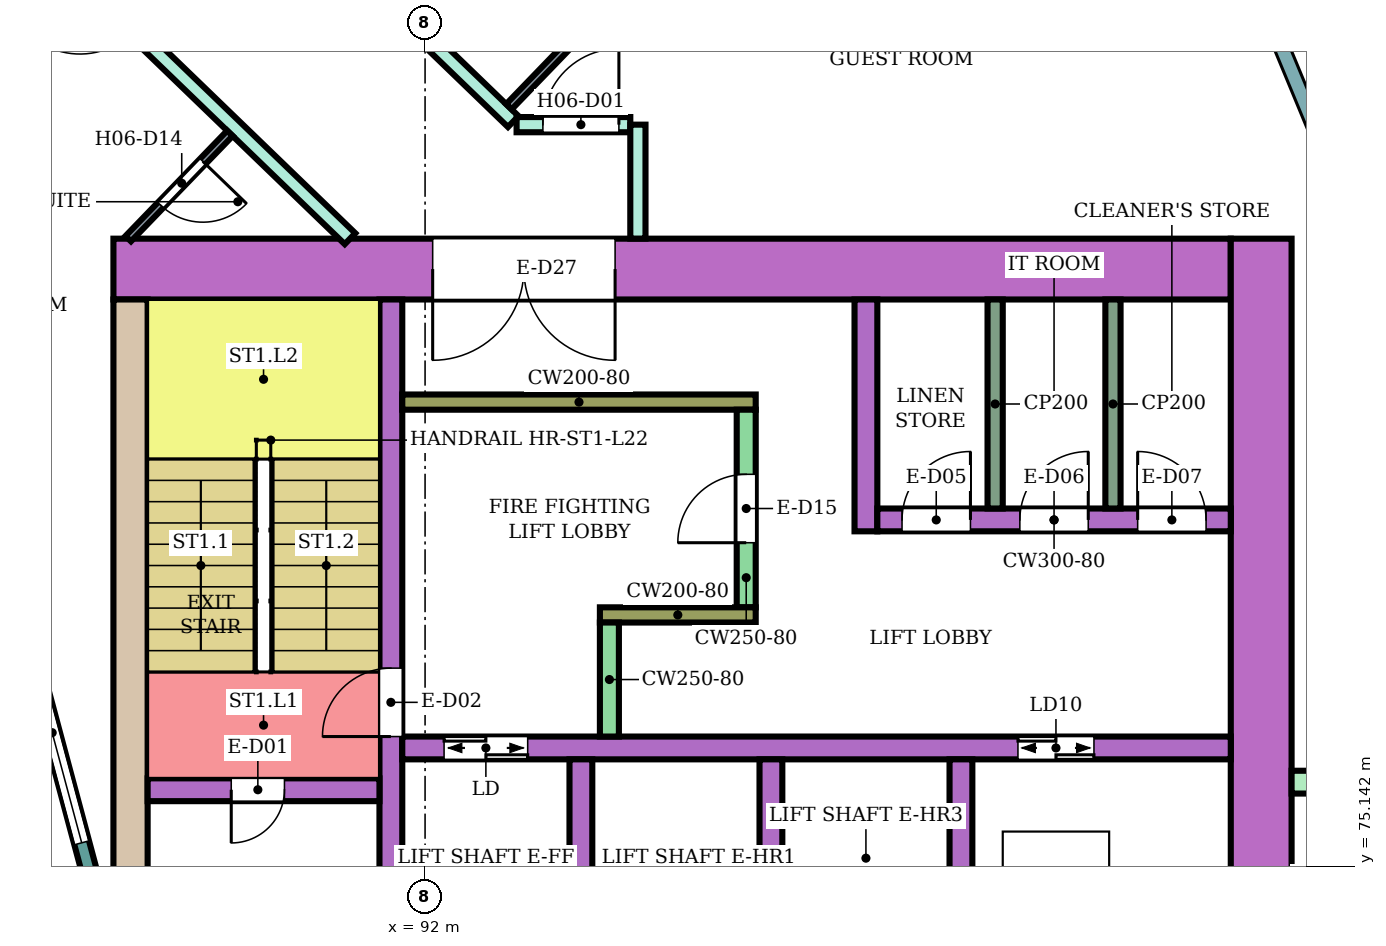
"""IFC4 building model, lengths in metres.
Left out: names, types, materials, properties, quantities, classifications, styles, units other than length and angle.
Written with IfcOpenShell. Run it as: python <this file> out.ifc"""

import sys

from ifc_helpers import new_model, si_unit, direction, frame, frame_2d, origin, place, context, subcontext, project, spatial, rectangle, extrude, element, fill, save


model = new_model("IFC4")
c1 = context("Model", 3, precision=1e-05, world=origin(), true_north=direction((0.0, 1.0)))
c2 = subcontext(c1, "Body", "Model", "MODEL_VIEW")
j1 = project(units=[si_unit("LENGTHUNIT", "METRE"), si_unit("PLANEANGLEUNIT", "RADIAN")], contexts=[c1])
p1 = place(None, origin())
s1 = spatial("IfcSite", under=j1, at=p1, CompositionType="ELEMENT")
p2 = place(p1, origin())
s2 = spatial("IfcBuilding", under=s1, at=p2, CompositionType="ELEMENT")
p3 = place(p2, frame((0.0, 0.0, 97.6)))
s3 = spatial("IfcBuildingStorey", under=s2, at=p3, CompositionType="ELEMENT", Elevation=97.6)
p4 = place(p3, frame((87.9, 83.0, 0.0), z_axis=(0.0, 0.0, 1.0), x_axis=(1.0, 0.0, 0.0)))
e1 = element("IfcWall", 1, at=p4, inside=s3, PredefinedType="SHEAR", context=c2, shape_type="SweptSolid", body=[
    extrude(rectangle(XDim=14.7, YDim=0.8, at=frame_2d((7.35, 0.0))), origin(), (0.0, 0.0, 1.0), 3.48),
])
p5 = place(p4, frame((4.2, 0.0, 0.0)))
e2 = element("IfcOpeningElement", 2, at=p5, cuts=e1, PredefinedType="OPENING", context=c2, shape_type="SweptSolid", body=[
    extrude(rectangle(XDim=2.4, YDim=2.4, at=frame_2d((1.2, 1.2))), frame((0.0, 0.41, 0.0), z_axis=(0.0, -1.0, 0.0), x_axis=(1.0, 0.0, 0.0)), (0.0, 0.0, 1.0), 0.82),
])
p6 = place(p3, frame((88.125, 75.0, 0.0), z_axis=(0.0, 0.0, 1.0), x_axis=(0.0, 1.0, 0.0)))
e3 = element("IfcWall", 3, at=p6, inside=s3, PredefinedType="SHEAR", context=c2, shape_type="SweptSolid", body=[
    extrude(rectangle(XDim=7.6, YDim=0.45, at=frame_2d((3.8, 0.0))), origin(), (0.0, 0.0, 1.0), 3.48),
])
p7 = place(p3, frame((103.0, 66.6, 0.0), z_axis=(0.0, 0.0, 1.0), x_axis=(0.0, 1.0, 0.0)))
e4 = element("IfcWall", 4, at=p7, inside=s3, PredefinedType="SHEAR", context=c2, shape_type="SweptSolid", body=[
    extrude(rectangle(XDim=16.8, YDim=0.8, at=frame_2d((8.4, 0.0))), origin(), (0.0, 0.0, 1.0), 3.48),
])
p8 = place(p3, frame((91.55, 75.0, 0.0), z_axis=(0.0, 0.0, 1.0), x_axis=(0.0, 1.0, 0.0)))
e5 = element("IfcWall", 5, at=p8, inside=s3, PredefinedType="SHEAR", context=c2, shape_type="SweptSolid", body=[
    extrude(rectangle(XDim=7.6, YDim=0.3, at=frame_2d((3.8, 0.0))), origin(), (0.0, 0.0, 1.0), 3.48),
])
p9 = place(p8, frame((1.85, 0.0, 0.0)))
e6 = element("IfcOpeningElement", 6, at=p9, cuts=e5, PredefinedType="OPENING", context=c2, shape_type="SweptSolid", body=[
    extrude(rectangle(XDim=0.9, YDim=2.1, at=frame_2d((0.45, 1.05))), frame((0.0, 0.16, 0.0), z_axis=(0.0, -1.0, 0.0), x_axis=(1.0, 0.0, 0.0)), (0.0, 0.0, 1.0), 0.32),
])
p10 = place(p3, frame((88.35, 76.15, 0.0), z_axis=(0.0, 0.0, 1.0), x_axis=(1.0, 0.0, 0.0)))
e7 = element("IfcWall", 7, at=p10, inside=s3, PredefinedType="SHEAR", context=c2, shape_type="SweptSolid", body=[
    extrude(rectangle(XDim=3.05, YDim=0.3, at=frame_2d((1.525, 0.0))), origin(), (0.0, 0.0, 1.0), 3.48),
])
p11 = place(p10, frame((1.1, 0.0, 0.0)))
e8 = element("IfcOpeningElement", 8, at=p11, cuts=e7, PredefinedType="OPENING", context=c2, shape_type="SweptSolid", body=[
    extrude(rectangle(XDim=0.7, YDim=2.0, at=frame_2d((0.35, 1.0))), frame((0.0, 0.16, 0.0), z_axis=(0.0, -1.0, 0.0), x_axis=(1.0, 0.0, 0.0)), (0.0, 0.0, 1.0), 0.32),
])
p12 = place(p3, frame((91.7, 76.7, 0.0), z_axis=(0.0, 0.0, 1.0), x_axis=(1.0, 0.0, 0.0)))
e9 = element("IfcWall", 9, at=p12, inside=s3, PredefinedType="SHEAR", context=c2, shape_type="SweptSolid", body=[
    extrude(rectangle(XDim=10.9, YDim=0.3, at=frame_2d((5.45, 0.0))), origin(), (0.0, 0.0, 1.0), 3.48),
])
p13 = place(p12, frame((0.55, 0.0, 0.0)))
e10 = element("IfcOpeningElement", 10, at=p13, cuts=e9, PredefinedType="OPENING", context=c2, shape_type="SweptSolid", body=[
    extrude(rectangle(XDim=1.1, YDim=2.1, at=frame_2d((0.55, 1.05))), frame((0.0, 0.16, 0.0), z_axis=(0.0, -1.0, 0.0), x_axis=(1.0, 0.0, 0.0)), (0.0, 0.0, 1.0), 0.32),
])
p14 = place(p12, frame((8.1, 0.0, 0.0)))
e11 = element("IfcOpeningElement", 11, at=p14, cuts=e9, PredefinedType="OPENING", context=c2, shape_type="SweptSolid", body=[
    extrude(rectangle(XDim=1.0, YDim=2.1, at=frame_2d((0.5, 1.05))), frame((0.0, 0.16, 0.0), z_axis=(0.0, -1.0, 0.0), x_axis=(1.0, 0.0, 0.0)), (0.0, 0.0, 1.0), 0.32),
])
for number, where, z_axis, x_axis in (
    (12, (94.05, 74.0, 0.0), (0.0, 0.0, 1.0), (0.0, 1.0, 0.0)),
    (13, (96.55, 74.0, 0.0), (0.0, 0.0, 1.0), (0.0, 1.0, 0.0)),
    (14, (99.05, 74.0, 0.0), (0.0, 0.0, 1.0), (0.0, 1.0, 0.0)),
):
    element("IfcWall", number, at=place(p3, frame(where, z_axis=z_axis, x_axis=x_axis)), inside=s3, PredefinedType="SHEAR", context=c2, shape_type="SweptSolid", body=[
        extrude(rectangle(XDim=2.55, YDim=0.3, at=frame_2d((1.275, 0.0))), origin(), (0.0, 0.0, 1.0), 3.48),
    ])
p15 = place(p3, frame((91.7, 81.25, 0.0), z_axis=(0.0, 0.0, 1.0), x_axis=(1.0, 0.0, 0.0)))
e15 = element("IfcWall", 15, at=p15, inside=s3, PredefinedType="SHEAR", context=c2, shape_type="SweptSolid", body=[
    extrude(rectangle(XDim=4.65, YDim=0.2, at=frame_2d((2.325, 0.0))), origin(), (0.0, 0.0, 1.0), 3.48),
])
p16 = place(p3, frame((96.225, 78.55, 0.0), z_axis=(0.0, 0.0, 1.0), x_axis=(0.0, 1.0, 0.0)))
e16 = element("IfcWall", 16, at=p16, inside=s3, PredefinedType="SHEAR", context=c2, shape_type="SweptSolid", body=[
    extrude(rectangle(XDim=2.6, YDim=0.25, at=frame_2d((1.3, 0.0))), origin(), (0.0, 0.0, 1.0), 3.48),
])
p17 = place(p16, frame((0.85, 0.0, 0.0)))
e17 = element("IfcOpeningElement", 17, at=p17, cuts=e16, PredefinedType="OPENING", context=c2, shape_type="SweptSolid", body=[
    extrude(rectangle(XDim=0.9, YDim=2.1, at=frame_2d((0.45, 1.05))), frame((0.0, 0.135, 0.0), z_axis=(0.0, -1.0, 0.0), x_axis=(1.0, 0.0, 0.0)), (0.0, 0.0, 1.0), 0.27),
])
p18 = place(p3, frame((94.3, 78.45, 0.0), z_axis=(0.0, 0.0, 1.0), x_axis=(1.0, 0.0, 0.0)))
e18 = element("IfcWall", 18, at=p18, inside=s3, PredefinedType="SHEAR", context=c2, shape_type="SweptSolid", body=[
    extrude(rectangle(XDim=2.05, YDim=0.2, at=frame_2d((1.025, 0.0))), origin(), (0.0, 0.0, 1.0), 3.48),
])
p19 = place(p3, frame((94.425, 76.85, 0.0), z_axis=(0.0, 0.0, 1.0), x_axis=(0.0, 1.0, 0.0)))
e19 = element("IfcWall", 19, at=p19, inside=s3, PredefinedType="SHEAR", context=c2, shape_type="SweptSolid", body=[
    extrude(rectangle(XDim=1.5, YDim=0.25, at=frame_2d((0.75, 0.0))), origin(), (0.0, 0.0, 1.0), 3.48),
])
p20 = place(p3, frame((97.8, 79.55, 0.0), z_axis=(0.0, 0.0, 1.0), x_axis=(0.0, 1.0, 0.0)))
e20 = element("IfcWall", 20, at=p20, inside=s3, PredefinedType="SHEAR", context=c2, shape_type="SweptSolid", body=[
    extrude(rectangle(XDim=3.05, YDim=0.3, at=frame_2d((1.525, 0.0))), origin(), (0.0, 0.0, 1.0), 3.48),
])
p21 = place(p3, frame((97.95, 79.7, 0.0), z_axis=(0.0, 0.0, 1.0), x_axis=(1.0, 0.0, 0.0)))
e21 = element("IfcWall", 21, at=p21, inside=s3, PredefinedType="SHEAR", context=c2, shape_type="SweptSolid", body=[
    extrude(rectangle(XDim=4.65, YDim=0.3, at=frame_2d((2.325, 0.0))), origin(), (0.0, 0.0, 1.0), 3.48),
])
p22 = place(p21, frame((0.325, 0.0, 0.0)))
e22 = element("IfcOpeningElement", 22, at=p22, cuts=e21, PredefinedType="OPENING", context=c2, shape_type="SweptSolid", body=[
    extrude(rectangle(XDim=0.9, YDim=2.1, at=frame_2d((0.45, 1.05))), frame((0.0, 0.16, 0.0), z_axis=(0.0, -1.0, 0.0), x_axis=(1.0, 0.0, 0.0)), (0.0, 0.0, 1.0), 0.32),
])
p23 = place(p21, frame((1.875, 0.0, 0.0)))
e23 = element("IfcOpeningElement", 23, at=p23, cuts=e21, PredefinedType="OPENING", context=c2, shape_type="SweptSolid", body=[
    extrude(rectangle(XDim=0.9, YDim=2.1, at=frame_2d((0.45, 1.05))), frame((0.0, 0.16, 0.0), z_axis=(0.0, -1.0, 0.0), x_axis=(1.0, 0.0, 0.0)), (0.0, 0.0, 1.0), 0.32),
])
p24 = place(p21, frame((3.425, 0.0, 0.0)))
e24 = element("IfcOpeningElement", 24, at=p24, cuts=e21, PredefinedType="OPENING", context=c2, shape_type="SweptSolid", body=[
    extrude(rectangle(XDim=0.9, YDim=2.1, at=frame_2d((0.45, 1.05))), frame((0.0, 0.16, 0.0), z_axis=(0.0, -1.0, 0.0), x_axis=(1.0, 0.0, 0.0)), (0.0, 0.0, 1.0), 0.32),
])
p25 = place(p3, frame((103.4, 76.25, 0.0), z_axis=(0.0, 0.0, 1.0), x_axis=(1.0, 0.0, 0.0)))
e25 = element("IfcWall", 25, at=p25, inside=s3, PredefinedType="NOTDEFINED", context=c2, shape_type="SweptSolid", body=[
    extrude(rectangle(XDim=2.416, YDim=0.3, at=frame_2d((1.208, 0.0))), origin(), (0.0, 0.0, 1.0), 3.8),
])
p26 = place(p3, frame((87.604, 75.0, 0.0), z_axis=(0.0, 0.0, 1.0), x_axis=(-0.258789828301, 0.965933654434, 0.0)))
e26 = element("IfcWall", 26, at=p26, inside=s3, PredefinedType="NOTDEFINED", context=c2, shape_type="SweptSolid", body=[
    extrude(rectangle(XDim=3.936, YDim=0.2, at=frame_2d((1.968, 0.0))), origin(), (0.0, 0.0, 1.0), 3.8),
])
p27 = place(p26, frame((0.468, 0.0, 0.9)))
e27 = element("IfcOpeningElement", 27, at=p27, cuts=e26, PredefinedType="OPENING", context=c2, shape_type="SweptSolid", body=[
    extrude(rectangle(XDim=3.0, YDim=2.3, at=frame_2d((1.5, 1.15))), frame((0.0, 0.11, 0.0), z_axis=(0.0, -1.0, 0.0), x_axis=(1.0, 0.0, 0.0)), (0.0, 0.0, 1.0), 0.22),
])
p28 = place(p3, frame((87.064, 87.211, 0.0), z_axis=(0.0, 0.0, 1.0), x_axis=(0.719540958932, -0.694450004262, 0.0)))
e28 = element("IfcWall", 28, at=p28, inside=s3, PredefinedType="PARTITIONING", context=c2, shape_type="SweptSolid", body=[
    extrude(rectangle(XDim=5.488, YDim=0.2, at=frame_2d((2.744, 0.0))), origin(), (0.0, 0.0, 1.0), 3.35),
])
p29 = place(p28, frame((0.55, 0.0, 0.0)))
e29 = element("IfcOpeningElement", 29, at=p29, cuts=e28, PredefinedType="OPENING", context=c2, shape_type="SweptSolid", body=[
    extrude(rectangle(XDim=1.0, YDim=2.1, at=frame_2d((0.5, 1.05))), frame((0.0, 0.11, 0.0), z_axis=(0.0, -1.0, 0.0), x_axis=(1.0, 0.0, 0.0)), (0.0, 0.0, 1.0), 0.22),
])
p30 = place(p3, frame((88.465, 89.473, 0.0), z_axis=(0.0, 0.0, 1.0), x_axis=(0.719474304909, -0.694519059908, 0.0)))
e30 = element("IfcWall", 30, at=p30, inside=s3, PredefinedType="PARTITIONING", context=c2, shape_type="SweptSolid", body=[
    extrude(rectangle(XDim=6.525, YDim=0.2, at=frame_2d((3.263, 0.0))), origin(), (0.0, 0.0, 1.0), 3.35),
])
p31 = place(p30, frame((2.633, 0.0, 0.0)))
e31 = element("IfcOpeningElement", 31, at=p31, cuts=e30, PredefinedType="OPENING", context=c2, shape_type="SweptSolid", body=[
    extrude(rectangle(XDim=1.1, YDim=2.1, at=frame_2d((0.55, 1.05))), frame((0.0, 0.11, 0.0), z_axis=(0.0, -1.0, 0.0), x_axis=(1.0, 0.0, 0.0)), (0.0, 0.0, 1.0), 0.22),
])
p32 = place(p3, frame((93.204, 84.9, 0.0), z_axis=(0.0, 0.0, 1.0), x_axis=(1.0, 0.0, 0.0)))
e32 = element("IfcWall", 32, at=p32, inside=s3, PredefinedType="PARTITIONING", context=c2, shape_type="SweptSolid", body=[
    extrude(rectangle(XDim=1.496, YDim=0.2, at=frame_2d((0.748, 0.0))), origin(), (0.0, 0.0, 1.0), 3.35),
])
p33 = place(p32, frame((0.346, 0.0, 0.0)))
e33 = element("IfcOpeningElement", 33, at=p33, cuts=e32, PredefinedType="OPENING", context=c2, shape_type="SweptSolid", body=[
    extrude(rectangle(XDim=1.0, YDim=2.1, at=frame_2d((0.5, 1.05))), frame((0.0, 0.11, 0.0), z_axis=(0.0, -1.0, 0.0), x_axis=(1.0, 0.0, 0.0)), (0.0, 0.0, 1.0), 0.22),
])
p34 = place(p3, frame((94.8, 83.401, 0.0), z_axis=(0.0, 0.0, 1.0), x_axis=(0.0, 1.0, 0.0)))
e34 = element("IfcWall", 34, at=p34, inside=s3, PredefinedType="PARTITIONING", context=c2, shape_type="SweptSolid", body=[
    extrude(rectangle(XDim=1.499, YDim=0.2, at=frame_2d((0.75, 0.0))), origin(), (0.0, 0.0, 1.0), 3.35),
])
p35 = place(p3, frame((88.095, 83.4, 0.0), z_axis=(0.0, 0.0, 1.0), x_axis=(0.694447472534, 0.719543402368, 0.0)))
e35 = element("IfcWall", 35, at=p35, inside=s3, PredefinedType="PARTITIONING", context=c2, shape_type="SweptSolid", body=[
    extrude(rectangle(XDim=1.926, YDim=0.1, at=frame_2d((0.963, 0.0))), origin(), (0.0, 0.0, 1.0), 3.35),
])
p36 = place(p35, frame((0.613, 0.0, 0.0)))
e36 = element("IfcOpeningElement", 36, at=p36, cuts=e35, PredefinedType="OPENING", context=c2, shape_type="SweptSolid", body=[
    extrude(rectangle(XDim=0.8, YDim=2.1, at=frame_2d((0.4, 1.05))), frame((0.0, 0.06, 0.0), z_axis=(0.0, -1.0, 0.0), x_axis=(1.0, 0.0, 0.0)), (0.0, 0.0, 1.0), 0.12),
])
p37 = place(p3, frame((93.104, 85.136, 0.0), z_axis=(0.0, 0.0, 1.0), x_axis=(0.694324808789, 0.719661767708, 0.0)))
e37 = element("IfcWall", 37, at=p37, inside=s3, PredefinedType="PARTITIONING", context=c2, shape_type="SweptSolid", body=[
    extrude(rectangle(XDim=2.65, YDim=0.1, at=frame_2d((1.325, 0.0))), origin(), (0.0, 0.0, 1.0), 3.35),
])
p38 = place(p37, frame((1.05, 0.0, 0.0)))
e38 = element("IfcOpeningElement", 38, at=p38, cuts=e37, PredefinedType="OPENING", context=c2, shape_type="SweptSolid", body=[
    extrude(rectangle(XDim=0.8, YDim=2.1, at=frame_2d((0.4, 1.05))), frame((0.0, 0.06, 0.0), z_axis=(0.0, -1.0, 0.0), x_axis=(1.0, 0.0, 0.0)), (0.0, 0.0, 1.0), 0.12),
])
for number, where, z_axis, x_axis in (
    (39, (99.5, 79.85, 0.0), (0.0, 0.0, 1.0), (0.0, 1.0, 0.0)),
    (40, (101.05, 79.85, 0.0), (0.0, 0.0, 1.0), (0.0, 1.0, 0.0)),
):
    element("IfcWall", number, at=place(p3, frame(where, z_axis=z_axis, x_axis=x_axis)), inside=s3, PredefinedType="PARTITIONING", context=c2, shape_type="SweptSolid", body=[
        extrude(rectangle(XDim=2.75, YDim=0.2, at=frame_2d((1.375, 0.0))), origin(), (0.0, 0.0, 1.0), 3.48),
    ])
p39 = place(p27, origin())
e41 = element("IfcWindow", 41, at=p39, inside=s3, PartitioningType="SINGLE_PANEL", PredefinedType="WINDOW", context=c2, shape_type="SweptSolid", body=[
    extrude(rectangle(XDim=3.0, YDim=2.3, at=frame_2d((1.5, 1.15))), frame((0.0, 0.03, 0.0), z_axis=(0.0, -1.0, 0.0), x_axis=(1.0, 0.0, 0.0)), (0.0, 0.0, 1.0), 0.06),
])
fill(e27, e41)
p40 = place(p33, origin())
e42 = element("IfcDoor", 42, at=p40, inside=s3, OperationType="SINGLE_SWING_RIGHT", PredefinedType="DOOR", context=c2, shape_type="SweptSolid", body=[
    extrude(rectangle(XDim=1.0, YDim=2.1, at=frame_2d((0.5, 1.05))), frame((0.0, 0.025, 0.0), z_axis=(0.0, -1.0, 0.0), x_axis=(1.0, 0.0, 0.0)), (0.0, 0.0, 1.0), 0.05),
])
fill(e33, e42)
p41 = place(p36, frame((0.8, 0.0, 0.0), z_axis=(0.0, 0.0, 1.0), x_axis=(-1.0, 0.0, 0.0)))
e43 = element("IfcDoor", 43, at=p41, inside=s3, OperationType="SINGLE_SWING_LEFT", PredefinedType="DOOR", context=c2, shape_type="SweptSolid", body=[
    extrude(rectangle(XDim=0.8, YDim=2.1, at=frame_2d((0.4, 1.05))), frame((0.0, 0.025, 0.0), z_axis=(0.0, -1.0, 0.0), x_axis=(1.0, 0.0, 0.0)), (0.0, 0.0, 1.0), 0.05),
])
fill(e36, e43)
p42 = place(p11, frame((0.7, 0.0, 0.0), z_axis=(0.0, 0.0, 1.0), x_axis=(-1.0, 0.0, 0.0)))
e44 = element("IfcDoor", 44, at=p42, inside=s3, OperationType="SINGLE_SWING_RIGHT", PredefinedType="DOOR", context=c2, shape_type="SweptSolid", body=[
    extrude(rectangle(XDim=0.7, YDim=2.0, at=frame_2d((0.35, 1.0))), frame((0.0, 0.025, 0.0), z_axis=(0.0, -1.0, 0.0), x_axis=(1.0, 0.0, 0.0)), (0.0, 0.0, 1.0), 0.05),
])
fill(e8, e44)
p43 = place(p9, origin())
e45 = element("IfcDoor", 45, at=p43, inside=s3, OperationType="SINGLE_SWING_LEFT", PredefinedType="DOOR", context=c2, shape_type="SweptSolid", body=[
    extrude(rectangle(XDim=0.9, YDim=2.1, at=frame_2d((0.45, 1.05))), frame((0.0, 0.025, 0.0), z_axis=(0.0, -1.0, 0.0), x_axis=(1.0, 0.0, 0.0)), (0.0, 0.0, 1.0), 0.05),
])
fill(e6, e45)
p44 = place(p13, origin())
e46 = element("IfcDoor", 46, at=p44, inside=s3, OperationType="DOUBLE_DOOR_SLIDING", PredefinedType="DOOR", context=c2, shape_type="SweptSolid", body=[
    extrude(rectangle(XDim=1.1, YDim=2.1, at=frame_2d((0.55, 1.05))), frame((0.0, 0.025, 0.0), z_axis=(0.0, -1.0, 0.0), x_axis=(1.0, 0.0, 0.0)), (0.0, 0.0, 1.0), 0.05),
])
fill(e10, e46)
p45 = place(p14, origin())
e47 = element("IfcDoor", 47, at=p45, inside=s3, OperationType="DOUBLE_DOOR_SLIDING", PredefinedType="DOOR", context=c2, shape_type="SweptSolid", body=[
    extrude(rectangle(XDim=1.0, YDim=2.1, at=frame_2d((0.5, 1.05))), frame((0.0, 0.025, 0.0), z_axis=(0.0, -1.0, 0.0), x_axis=(1.0, 0.0, 0.0)), (0.0, 0.0, 1.0), 0.05),
])
fill(e11, e47)
p46 = place(p17, origin())
e48 = element("IfcDoor", 48, at=p46, inside=s3, OperationType="SINGLE_SWING_LEFT", PredefinedType="DOOR", context=c2, shape_type="SweptSolid", body=[
    extrude(rectangle(XDim=0.9, YDim=2.1, at=frame_2d((0.45, 1.05))), frame((0.0, 0.025, 0.0), z_axis=(0.0, -1.0, 0.0), x_axis=(1.0, 0.0, 0.0)), (0.0, 0.0, 1.0), 0.05),
])
fill(e17, e48)
p47 = place(p22, origin())
e49 = element("IfcDoor", 49, at=p47, inside=s3, OperationType="SINGLE_SWING_RIGHT", PredefinedType="DOOR", context=c2, shape_type="SweptSolid", body=[
    extrude(rectangle(XDim=0.9, YDim=2.1, at=frame_2d((0.45, 1.05))), frame((0.0, 0.025, 0.0), z_axis=(0.0, -1.0, 0.0), x_axis=(1.0, 0.0, 0.0)), (0.0, 0.0, 1.0), 0.05),
])
fill(e22, e49)
p48 = place(p23, origin())
e50 = element("IfcDoor", 50, at=p48, inside=s3, OperationType="SINGLE_SWING_RIGHT", PredefinedType="DOOR", context=c2, shape_type="SweptSolid", body=[
    extrude(rectangle(XDim=0.9, YDim=2.1, at=frame_2d((0.45, 1.05))), frame((0.0, 0.025, 0.0), z_axis=(0.0, -1.0, 0.0), x_axis=(1.0, 0.0, 0.0)), (0.0, 0.0, 1.0), 0.05),
])
fill(e23, e50)
p49 = place(p24, origin())
e51 = element("IfcDoor", 51, at=p49, inside=s3, OperationType="SINGLE_SWING_LEFT", PredefinedType="DOOR", context=c2, shape_type="SweptSolid", body=[
    extrude(rectangle(XDim=0.9, YDim=2.1, at=frame_2d((0.45, 1.05))), frame((0.0, 0.025, 0.0), z_axis=(0.0, -1.0, 0.0), x_axis=(1.0, 0.0, 0.0)), (0.0, 0.0, 1.0), 0.05),
])
fill(e24, e51)
p50 = place(p5, frame((2.4, 0.0, 0.0), z_axis=(0.0, 0.0, 1.0), x_axis=(-1.0, 0.0, 0.0)))
e52 = element("IfcDoor", 52, at=p50, inside=s3, OperationType="DOUBLE_DOOR_SINGLE_SWING", PredefinedType="DOOR", context=c2, shape_type="SweptSolid", body=[
    extrude(rectangle(XDim=2.4, YDim=2.4, at=frame_2d((1.2, 1.2))), frame((0.0, 0.025, 0.0), z_axis=(0.0, -1.0, 0.0), x_axis=(1.0, 0.0, 0.0)), (0.0, 0.0, 1.0), 0.05),
])
fill(e2, e52)
save(model, sys.argv[1])
